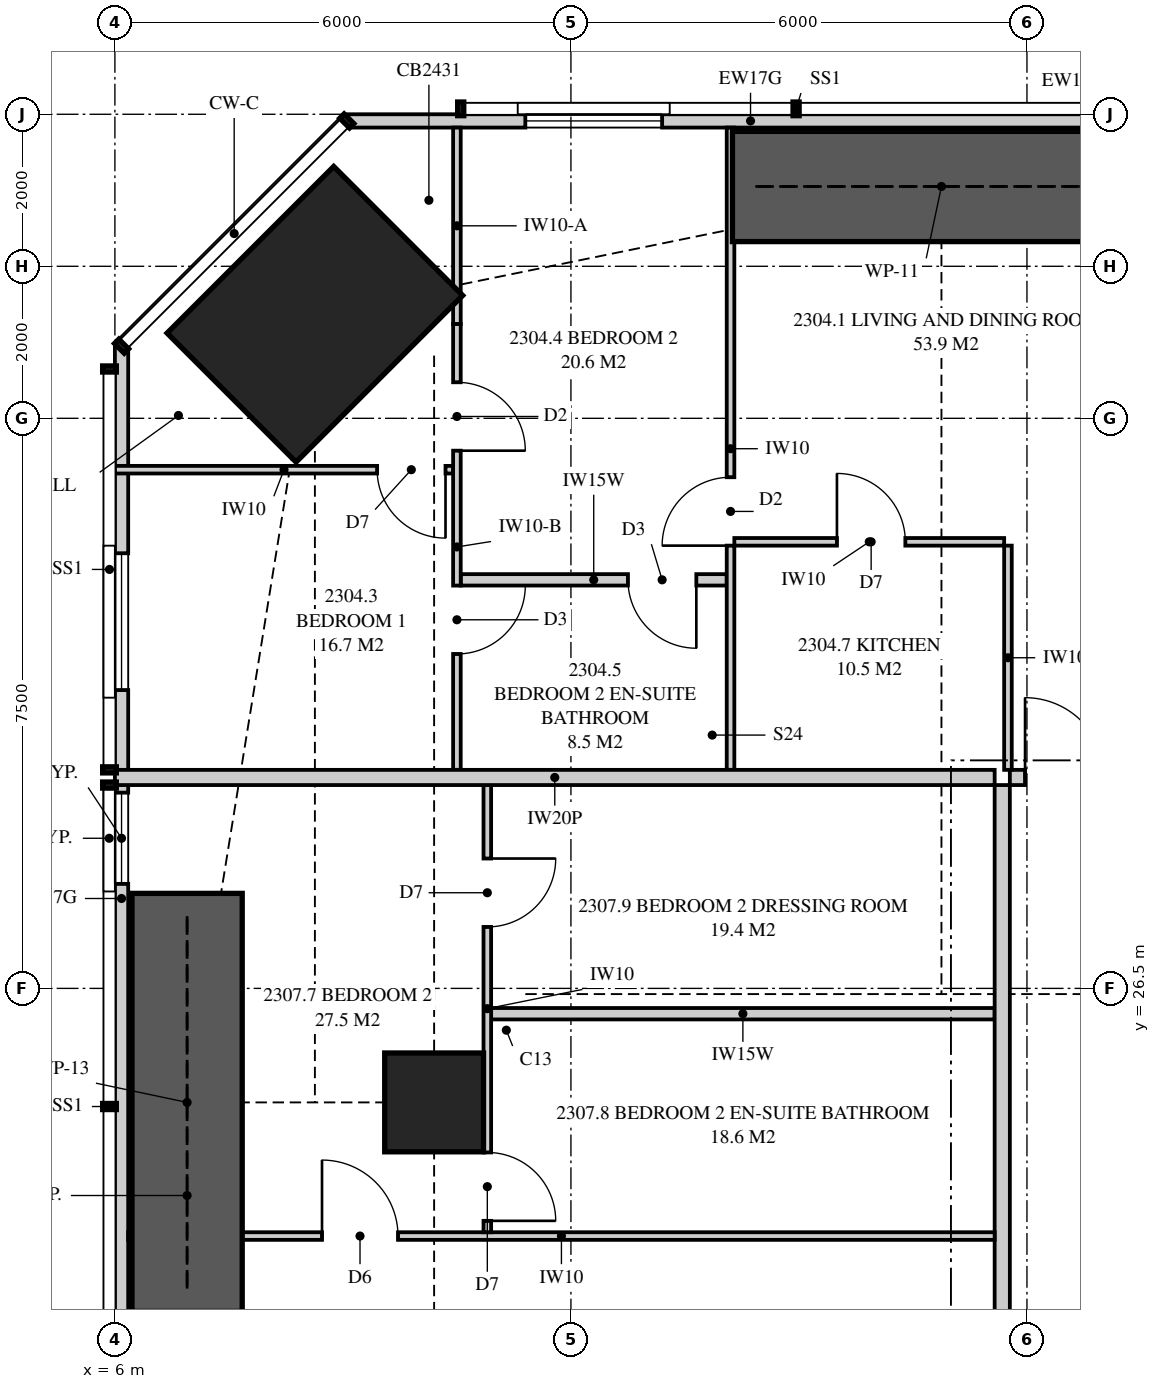
"""IFC4 building model, lengths in metres.
Left out: names, types, materials, properties, quantities, classifications, styles, units other than length and angle.
Written with IfcOpenShell. Run it as: python <this file> out.ifc"""

import sys

from ifc_helpers import new_model, si_unit, direction, frame, frame_2d, origin, origin_2d, place, context, subcontext, project, spatial, polyline, rectangle, hollow_rectangle, outline, extrude, element, fill, save


model = new_model("IFC4")
c1 = context("Model", 3, precision=1e-05, world=origin(), true_north=direction((0.0, 1.0)))
c2 = subcontext(c1, "Body", "Model", "MODEL_VIEW")
j1 = project(units=[si_unit("LENGTHUNIT", "METRE"), si_unit("PLANEANGLEUNIT", "RADIAN")], contexts=[c1])
p1 = place(None, origin())
s1 = spatial("IfcSite", under=j1, at=p1, CompositionType="ELEMENT")
p2 = place(p1, origin())
s2 = spatial("IfcBuilding", under=s1, at=p2, CompositionType="ELEMENT")
p3 = place(p2, frame((0.0, 0.0, 88.1)))
s3 = spatial("IfcBuildingStorey", under=s2, at=p3, CompositionType="ELEMENT", Elevation=88.1)
p4 = place(p3, frame((8.631, 35.369, 0.0), z_axis=(0.0, 0.0, 1.0), x_axis=(0.707106781187, -0.707106781187, 0.0)))
e1 = element("IfcColumn", 1, at=p4, inside=s3, PredefinedType="COLUMN", context=c2, shape_type="SweptSolid", body=[
    extrude(hollow_rectangle(XDim=2.4, YDim=3.1, WallThickness=0.125, at=origin_2d()), origin(), (0.0, 0.0, 1.0), 3.35),
])
p5 = place(p3, frame((10.2, 25.0, 0.0), z_axis=(0.0, 0.0, 1.0), x_axis=(1.0, 0.0, 0.0)))
e2 = element("IfcColumn", 2, at=p5, inside=s3, PredefinedType="COLUMN", context=c2, shape_type="SweptSolid", body=[
    extrude(rectangle(XDim=1.3, YDim=1.3, at=origin_2d()), origin(), (0.0, 0.0, 1.0), 3.35),
])
p6 = place(p3, frame((19.675, 37.913, 0.0), z_axis=(0.0, 0.0, 1.0), x_axis=(-1.0, 0.0, 0.0)))
e3 = element("IfcWall", 3, at=p6, inside=s3, PredefinedType="SOLIDWALL", context=c2, shape_type="SweptSolid", body=[
    extrude(outline(polyline([(0.0, 0.0), (10.624, 0.0), (10.624, 3.11), (3.003, 3.11), (3.003, 2.15), (2.958, 2.15), (2.958, 3.11), (2.8, 3.11), (2.8, 2.15), (0.0, 2.15), (0.0, 0.0)])), frame((0.0, 0.087, 0.0), z_axis=(0.0, -1.0, 0.0), x_axis=(1.0, 0.0, 0.0)), (0.0, 0.0, 1.0), 0.175),
])
p7 = place(p6, frame((6.475, 0.0, 0.4)))
e4 = element("IfcOpeningElement", 4, at=p7, cuts=e3, PredefinedType="OPENING", context=c2, shape_type="SweptSolid", body=[
    extrude(rectangle(XDim=1.8, YDim=1.7, at=frame_2d((0.9, 0.85))), frame((0.0, 0.097, 0.0), z_axis=(0.0, -1.0, 0.0), x_axis=(1.0, 0.0, 0.0)), (0.0, 0.0, 1.0), 0.195),
])
p8 = place(p3, frame((6.087, 34.949, 0.0), z_axis=(0.0, 0.0, 1.0), x_axis=(0.0, -1.0, 0.0)))
e5 = element("IfcWall", 5, at=p8, inside=s3, PredefinedType="SOLIDWALL", context=c2, shape_type="SweptSolid", body=[
    extrude(outline(polyline([(0.0, 0.0), (14.532, 0.0), (14.532, 2.15), (9.949, 2.15), (9.949, 3.11), (9.823, 3.11), (9.823, 2.15), (9.73, 2.15), (9.73, 3.11), (0.0, 3.11), (0.0, 0.0)])), frame((0.0, 0.087, 0.0), z_axis=(0.0, -1.0, 0.0), x_axis=(1.0, 0.0, 0.0)), (0.0, 0.0, 1.0), 0.175),
])
p9 = place(p8, frame((2.724, 0.0, 0.4)))
e6 = element("IfcOpeningElement", 6, at=p9, cuts=e5, PredefinedType="OPENING", context=c2, shape_type="SweptSolid", body=[
    extrude(rectangle(XDim=1.8, YDim=1.7, at=frame_2d((0.9, 0.85))), frame((0.0, 0.097, 0.0), z_axis=(0.0, -1.0, 0.0), x_axis=(1.0, 0.0, 0.0)), (0.0, 0.0, 1.0), 0.195),
])
p10 = place(p8, frame((5.874, 0.0, 0.4)))
e7 = element("IfcOpeningElement", 7, at=p10, cuts=e5, PredefinedType="OPENING", context=c2, shape_type="SweptSolid", body=[
    extrude(rectangle(XDim=1.2, YDim=1.7, at=frame_2d((0.6, 0.85))), frame((0.0, 0.097, 0.0), z_axis=(0.0, -1.0, 0.0), x_axis=(1.0, 0.0, 0.0)), (0.0, 0.0, 1.0), 0.195),
])
p11 = place(p3, frame((17.775, 29.275, 0.0), z_axis=(0.0, 0.0, 1.0), x_axis=(1.0, 0.0, 0.0)))
e8 = element("IfcWall", 8, at=p11, inside=s3, PredefinedType="PARTITIONING", context=c2, shape_type="SweptSolid", body=[
    extrude(rectangle(XDim=8.375, YDim=0.2, at=frame_2d((4.188, 0.0))), origin(), (0.0, 0.0, 1.0), 3.11),
])
p12 = place(p11, frame((0.2, 0.0, 0.0)))
e9 = element("IfcOpeningElement", 9, at=p12, cuts=e8, PredefinedType="OPENING", context=c2, shape_type="SweptSolid", body=[
    extrude(rectangle(XDim=1.05, YDim=2.2, at=frame_2d((0.525, 1.1))), frame((0.0, 0.11, 0.0), z_axis=(0.0, -1.0, 0.0), x_axis=(1.0, 0.0, 0.0)), (0.0, 0.0, 1.0), 0.22),
])
p13 = place(p3, frame((10.5, 37.825, 0.0), z_axis=(0.0, 0.0, 1.0), x_axis=(0.0, -1.0, 0.0)))
e10 = element("IfcWall", 10, at=p13, inside=s3, PredefinedType="PARTITIONING", context=c2, shape_type="SweptSolid", body=[
    extrude(outline(polyline([(0.0, 0.0), (2.585, 0.0), (2.585, 2.15), (1.198, 2.15), (1.198, 3.11), (0.0, 3.11), (0.0, 0.0)])), frame((0.0, 0.05, 0.0), z_axis=(0.0, -1.0, 0.0), x_axis=(1.0, 0.0, 0.0)), (0.0, 0.0, 1.0), 0.1),
])
p14 = place(p3, frame((10.5, 35.24, 0.0), z_axis=(0.0, 0.0, 1.0), x_axis=(0.0, -1.0, 0.0)))
e11 = element("IfcWall", 11, at=p14, inside=s3, PredefinedType="PARTITIONING", context=c2, shape_type="SweptSolid", body=[
    extrude(outline(polyline([(0.0, 0.0), (5.865, 0.0), (5.865, 2.51), (0.368, 2.51), (0.368, 2.15), (0.0, 2.15), (0.0, 0.0)])), frame((0.0, 0.05, 0.0), z_axis=(0.0, -1.0, 0.0), x_axis=(1.0, 0.0, 0.0)), (0.0, 0.0, 1.0), 0.1),
])
p15 = place(p14, frame((0.766, 0.0, 0.0)))
e12 = element("IfcOpeningElement", 12, at=p15, cuts=e11, PredefinedType="OPENING", context=c2, shape_type="SweptSolid", body=[
    extrude(rectangle(XDim=0.9, YDim=2.1, at=frame_2d((0.45, 1.05))), frame((0.0, 0.06, 0.0), z_axis=(0.0, -1.0, 0.0), x_axis=(1.0, 0.0, 0.0)), (0.0, 0.0, 1.0), 0.12),
])
p16 = place(p14, frame((3.441, 0.0, 0.0)))
e13 = element("IfcOpeningElement", 13, at=p16, cuts=e11, PredefinedType="OPENING", context=c2, shape_type="SweptSolid", body=[
    extrude(rectangle(XDim=0.9, YDim=2.1, at=frame_2d((0.45, 1.05))), frame((0.0, 0.06, 0.0), z_axis=(0.0, -1.0, 0.0), x_axis=(1.0, 0.0, 0.0)), (0.0, 0.0, 1.0), 0.12),
])
p17 = place(p3, frame((14.1, 37.825, 0.0), z_axis=(0.0, 0.0, 1.0), x_axis=(0.0, -1.0, 0.0)))
e14 = element("IfcWall", 14, at=p17, inside=s3, PredefinedType="PARTITIONING", context=c2, shape_type="SweptSolid", body=[
    extrude(outline(polyline([(0.0, 0.0), (8.45, 0.0), (8.45, 3.11), (2.219, 3.11), (2.219, 2.15), (0.463, 2.15), (0.463, 3.11), (0.0, 3.11), (0.0, 0.0)])), frame((0.0, 0.05, 0.0), z_axis=(0.0, -1.0, 0.0), x_axis=(1.0, 0.0, 0.0)), (0.0, 0.0, 1.0), 0.1),
])
p18 = place(p17, frame((4.6, 0.0, 0.0)))
e15 = element("IfcOpeningElement", 15, at=p18, cuts=e14, PredefinedType="OPENING", context=c2, shape_type="SweptSolid", body=[
    extrude(rectangle(XDim=0.9, YDim=2.1, at=frame_2d((0.45, 1.05))), frame((0.0, 0.06, 0.0), z_axis=(0.0, -1.0, 0.0), x_axis=(1.0, 0.0, 0.0)), (0.0, 0.0, 1.0), 0.12),
])
p19 = place(p3, frame((6.0, 33.324, 0.0), z_axis=(0.0, 0.0, 1.0), x_axis=(1.0, 0.0, 0.0)))
e16 = element("IfcWall", 16, at=p19, inside=s3, PredefinedType="PARTITIONING", context=c2, shape_type="SweptSolid", body=[
    extrude(outline(polyline([(0.0, 0.0), (4.45, 0.0), (4.45, 3.11), (4.45, 2.51), (3.171, 2.51), (3.171, 2.15), (1.429, 2.15), (1.429, 3.11), (0.0, 3.11), (0.0, 0.0)])), frame((0.0, 0.05, 0.0), z_axis=(0.0, -1.0, 0.0), x_axis=(1.0, 0.0, 0.0)), (0.0, 0.0, 1.0), 0.1),
])
p20 = place(p19, frame((3.45, 0.0, 0.0)))
e17 = element("IfcOpeningElement", 17, at=p20, cuts=e16, PredefinedType="OPENING", context=c2, shape_type="SweptSolid", body=[
    extrude(rectangle(XDim=0.9, YDim=2.1, at=frame_2d((0.45, 1.05))), frame((0.0, 0.06, 0.0), z_axis=(0.0, -1.0, 0.0), x_axis=(1.0, 0.0, 0.0)), (0.0, 0.0, 1.0), 0.12),
])
p21 = place(p3, frame((10.55, 31.875, 0.0), z_axis=(0.0, 0.0, 1.0), x_axis=(1.0, 0.0, 0.0)))
e18 = element("IfcWall", 18, at=p21, inside=s3, PredefinedType="PLUMBINGWALL", context=c2, shape_type="SweptSolid", body=[
    extrude(outline(polyline([(0.0, 0.0), (3.5, 0.0), (3.5, 3.11), (0.935, 3.11), (0.935, 2.51), (0.0, 2.51), (0.0, 3.11), (0.0, 0.0)])), frame((0.0, 0.075, 0.0), z_axis=(0.0, -1.0, 0.0), x_axis=(1.0, 0.0, 0.0)), (0.0, 0.0, 1.0), 0.15),
])
p22 = place(p21, frame((2.2, 0.0, 0.0)))
e19 = element("IfcOpeningElement", 19, at=p22, cuts=e18, PredefinedType="OPENING", context=c2, shape_type="SweptSolid", body=[
    extrude(rectangle(XDim=0.9, YDim=2.1, at=frame_2d((0.45, 1.05))), frame((0.0, 0.085, 0.0), z_axis=(0.0, -1.0, 0.0), x_axis=(1.0, 0.0, 0.0)), (0.0, 0.0, 1.0), 0.17),
])
p23 = place(p3, frame((14.15, 32.375, 0.0), z_axis=(0.0, 0.0, 1.0), x_axis=(1.0, 0.0, 0.0)))
e20 = element("IfcWall", 20, at=p23, inside=s3, PredefinedType="PARTITIONING", context=c2, shape_type="SweptSolid", body=[
    extrude(outline(polyline([(0.0, 0.0), (3.55, 0.0), (3.55, 3.11), (3.021, 3.11), (3.021, 2.531), (2.429, 2.531), (2.429, 3.11), (0.0, 3.11), (0.0, 0.0)])), frame((0.0, 0.05, 0.0), z_axis=(0.0, -1.0, 0.0), x_axis=(1.0, 0.0, 0.0)), (0.0, 0.0, 1.0), 0.1),
])
p24 = place(p23, frame((1.35, 0.0, 0.0)))
e21 = element("IfcOpeningElement", 21, at=p24, cuts=e20, PredefinedType="OPENING", context=c2, shape_type="SweptSolid", body=[
    extrude(rectangle(XDim=0.9, YDim=2.1, at=frame_2d((0.45, 1.05))), frame((0.0, 0.06, 0.0), z_axis=(0.0, -1.0, 0.0), x_axis=(1.0, 0.0, 0.0)), (0.0, 0.0, 1.0), 0.12),
])
p25 = place(p3, frame((17.75, 32.325, 0.0), z_axis=(0.0, 0.0, 1.0), x_axis=(0.0, -1.0, 0.0)))
e22 = element("IfcWall", 22, at=p25, inside=s3, PredefinedType="PARTITIONING", context=c2, shape_type="SweptSolid", body=[
    extrude(rectangle(XDim=2.95, YDim=0.1, at=frame_2d((1.475, 0.0))), origin(), (0.0, 0.0, 1.0), 3.11),
])
p26 = place(p3, frame((6.0, 29.275, 0.0), z_axis=(0.0, 0.0, 1.0), x_axis=(1.0, 0.0, 0.0)))
e23 = element("IfcWall", 23, at=p26, inside=s3, PredefinedType="PARTITIONING", context=c2, shape_type="SweptSolid", body=[
    extrude(outline(polyline([(0.0, 0.0), (11.575, 0.0), (11.575, 3.11), (11.221, 3.11), (11.221, 2.531), (10.529, 2.531), (10.529, 3.11), (5.51, 3.11), (5.51, 2.51), (2.978, 2.51), (2.978, 2.531), (2.565, 2.531), (2.565, 2.15), (0.721, 2.15), (0.721, 3.11), (0.0, 3.11), (0.0, 0.0)])), frame((0.0, 0.1, 0.0), z_axis=(0.0, -1.0, 0.0), x_axis=(1.0, 0.0, 0.0)), (0.0, 0.0, 1.0), 0.2),
])
p27 = place(p3, frame((6.175, 23.242, 0.0), z_axis=(0.0, 0.0, 1.0), x_axis=(1.0, 0.0, 0.0)))
e24 = element("IfcWall", 24, at=p27, inside=s3, PredefinedType="PARTITIONING", context=c2, shape_type="SweptSolid", body=[
    extrude(outline(polyline([(0.526, 2.15), (0.0, 2.15), (0.0, 0.0), (0.526, 0.0), (0.526, 0.28), (1.024, 0.28), (1.024, 0.0), (11.4, 0.0), (11.4, 3.11), (5.285, 3.11), (5.285, 2.51), (2.765, 2.51), (2.765, 3.11), (1.635, 3.11), (1.635, 2.15), (1.024, 2.15), (1.024, 1.87), (0.526, 1.87), (0.526, 2.15)])), frame((0.0, 0.05, 0.0), z_axis=(0.0, -1.0, 0.0), x_axis=(1.0, 0.0, 0.0)), (0.0, 0.0, 1.0), 0.1),
])
p28 = place(p27, frame((2.55, 0.0, 0.0)))
e25 = element("IfcOpeningElement", 25, at=p28, cuts=e24, PredefinedType="OPENING", context=c2, shape_type="SweptSolid", body=[
    extrude(rectangle(XDim=1.0, YDim=2.1, at=frame_2d((0.5, 1.05))), frame((0.0, 0.06, 0.0), z_axis=(0.0, -1.0, 0.0), x_axis=(1.0, 0.0, 0.0)), (0.0, 0.0, 1.0), 0.12),
])
p29 = place(p3, frame((17.675, 19.7, 0.0), z_axis=(0.0, 0.0, 1.0), x_axis=(0.0, 1.0, 0.0)))
e26 = element("IfcWall", 26, at=p29, inside=s3, PredefinedType="PARTITIONING", context=c2, shape_type="SweptSolid", body=[
    extrude(outline(polyline([(0.0, 0.0), (9.475, 0.0), (9.475, 3.11), (7.071, 3.11), (7.071, 2.531), (6.379, 2.531), (6.379, 3.11), (0.0, 3.11), (0.0, 0.0)])), frame((0.0, 0.1, 0.0), z_axis=(0.0, -1.0, 0.0), x_axis=(1.0, 0.0, 0.0)), (0.0, 0.0, 1.0), 0.2),
])
p30 = place(p3, frame((10.9, 23.292, 0.0), z_axis=(0.0, 0.0, 1.0), x_axis=(0.0, 1.0, 0.0)))
e27 = element("IfcWall", 27, at=p30, inside=s3, PredefinedType="PARTITIONING", context=c2, shape_type="SweptSolid", body=[
    extrude(outline(polyline([(0.0, 0.0), (5.883, 0.0), (5.883, 3.11), (5.883, 2.51), (1.768, 2.51), (0.0, 2.51), (0.0, 3.11), (0.0, 0.0)])), frame((0.0, 0.05, 0.0), z_axis=(0.0, -1.0, 0.0), x_axis=(1.0, 0.0, 0.0)), (0.0, 0.0, 1.0), 0.1),
])
p31 = place(p30, frame((0.15, 0.0, 0.0)))
e28 = element("IfcOpeningElement", 28, at=p31, cuts=e27, PredefinedType="OPENING", context=c2, shape_type="SweptSolid", body=[
    extrude(rectangle(XDim=0.9, YDim=2.1, at=frame_2d((0.45, 1.05))), frame((0.0, 0.06, 0.0), z_axis=(0.0, -1.0, 0.0), x_axis=(1.0, 0.0, 0.0)), (0.0, 0.0, 1.0), 0.12),
])
p32 = place(p30, frame((4.017, 0.0, 0.0)))
e29 = element("IfcOpeningElement", 29, at=p32, cuts=e27, PredefinedType="OPENING", context=c2, shape_type="SweptSolid", body=[
    extrude(rectangle(XDim=0.9, YDim=2.1, at=frame_2d((0.45, 1.05))), frame((0.0, 0.06, 0.0), z_axis=(0.0, -1.0, 0.0), x_axis=(1.0, 0.0, 0.0)), (0.0, 0.0, 1.0), 0.12),
])
p33 = place(p3, frame((10.95, 26.167, 0.0), z_axis=(0.0, 0.0, 1.0), x_axis=(1.0, 0.0, 0.0)))
e30 = element("IfcWall", 30, at=p33, inside=s3, PredefinedType="PLUMBINGWALL", context=c2, shape_type="SweptSolid", body=[
    extrude(outline(polyline([(0.0, 0.0), (6.625, 0.0), (6.625, 3.11), (6.625, 2.531), (0.535, 2.531), (0.535, 2.51), (0.0, 2.51), (0.0, 3.11), (0.0, 0.0)])), frame((0.0, 0.075, 0.0), z_axis=(0.0, -1.0, 0.0), x_axis=(1.0, 0.0, 0.0)), (0.0, 0.0, 1.0), 0.15),
])
for number, where, z_axis, x_axis in (
    (31, (14.125, 37.05, 0.0), (0.0, 0.0, 1.0), (1.0, 0.0, 0.0)),
    (32, (6.95, 22.25, 0.0), (0.0, 0.0, 1.0), (0.0, 1.0, 0.0)),
):
    element("IfcWall", number, at=place(p3, frame(where, z_axis=z_axis, x_axis=x_axis)), inside=s3, PredefinedType="SHEAR", context=c2, shape_type="SweptSolid", body=[
        extrude(rectangle(XDim=5.5, YDim=1.45, at=frame_2d((2.75, 0.0))), origin(), (0.0, 0.0, 1.0), 3.35),
    ])
p34 = place(p7, origin())
e33 = element("IfcWindow", 33, at=p34, inside=s3, PartitioningType="SINGLE_PANEL", PredefinedType="WINDOW", context=c2, shape_type="SweptSolid", body=[
    extrude(rectangle(XDim=1.8, YDim=1.7, at=frame_2d((0.9, 0.85))), frame((0.0, 0.03, 0.0), z_axis=(0.0, -1.0, 0.0), x_axis=(1.0, 0.0, 0.0)), (0.0, 0.0, 1.0), 0.06),
])
fill(e4, e33)
p35 = place(p9, origin())
e34 = element("IfcWindow", 34, at=p35, inside=s3, PartitioningType="SINGLE_PANEL", PredefinedType="WINDOW", context=c2, shape_type="SweptSolid", body=[
    extrude(rectangle(XDim=1.8, YDim=1.7, at=frame_2d((0.9, 0.85))), frame((0.0, 0.03, 0.0), z_axis=(0.0, -1.0, 0.0), x_axis=(1.0, 0.0, 0.0)), (0.0, 0.0, 1.0), 0.06),
])
fill(e6, e34)
p36 = place(p10, origin())
e35 = element("IfcWindow", 35, at=p36, inside=s3, PartitioningType="SINGLE_PANEL", PredefinedType="WINDOW", context=c2, shape_type="SweptSolid", body=[
    extrude(rectangle(XDim=1.2, YDim=1.7, at=frame_2d((0.6, 0.85))), frame((0.0, 0.03, 0.0), z_axis=(0.0, -1.0, 0.0), x_axis=(1.0, 0.0, 0.0)), (0.0, 0.0, 1.0), 0.06),
])
fill(e7, e35)
p37 = place(p12, origin())
e36 = element("IfcDoor", 36, at=p37, inside=s3, OperationType="SINGLE_SWING_LEFT", PredefinedType="DOOR", context=c2, shape_type="SweptSolid", body=[
    extrude(rectangle(XDim=1.05, YDim=2.2, at=frame_2d((0.525, 1.1))), frame((0.0, 0.025, 0.0), z_axis=(0.0, -1.0, 0.0), x_axis=(1.0, 0.0, 0.0)), (0.0, 0.0, 1.0), 0.05),
])
fill(e9, e36)
p38 = place(p20, frame((0.9, 0.0, 0.0), z_axis=(0.0, 0.0, 1.0), x_axis=(-1.0, 0.0, 0.0)))
e37 = element("IfcDoor", 37, at=p38, inside=s3, OperationType="SINGLE_SWING_LEFT", PredefinedType="DOOR", context=c2, shape_type="SweptSolid", body=[
    extrude(rectangle(XDim=0.9, YDim=2.1, at=frame_2d((0.45, 1.05))), frame((0.0, 0.025, 0.0), z_axis=(0.0, -1.0, 0.0), x_axis=(1.0, 0.0, 0.0)), (0.0, 0.0, 1.0), 0.05),
])
fill(e17, e37)
p39 = place(p15, origin())
e38 = element("IfcDoor", 38, at=p39, inside=s3, OperationType="SINGLE_SWING_RIGHT", PredefinedType="DOOR", context=c2, shape_type="SweptSolid", body=[
    extrude(rectangle(XDim=0.9, YDim=2.1, at=frame_2d((0.45, 1.05))), frame((0.0, 0.025, 0.0), z_axis=(0.0, -1.0, 0.0), x_axis=(1.0, 0.0, 0.0)), (0.0, 0.0, 1.0), 0.05),
])
fill(e12, e38)
p40 = place(p18, frame((0.9, 0.0, 0.0), z_axis=(0.0, 0.0, 1.0), x_axis=(-1.0, 0.0, 0.0)))
e39 = element("IfcDoor", 39, at=p40, inside=s3, OperationType="SINGLE_SWING_LEFT", PredefinedType="DOOR", context=c2, shape_type="SweptSolid", body=[
    extrude(rectangle(XDim=0.9, YDim=2.1, at=frame_2d((0.45, 1.05))), frame((0.0, 0.025, 0.0), z_axis=(0.0, -1.0, 0.0), x_axis=(1.0, 0.0, 0.0)), (0.0, 0.0, 1.0), 0.05),
])
fill(e15, e39)
p41 = place(p22, frame((0.9, 0.0, 0.0), z_axis=(0.0, 0.0, 1.0), x_axis=(-1.0, 0.0, 0.0)))
e40 = element("IfcDoor", 40, at=p41, inside=s3, OperationType="SINGLE_SWING_LEFT", PredefinedType="DOOR", context=c2, shape_type="SweptSolid", body=[
    extrude(rectangle(XDim=0.9, YDim=2.1, at=frame_2d((0.45, 1.05))), frame((0.0, 0.025, 0.0), z_axis=(0.0, -1.0, 0.0), x_axis=(1.0, 0.0, 0.0)), (0.0, 0.0, 1.0), 0.05),
])
fill(e19, e40)
p42 = place(p16, origin())
e41 = element("IfcDoor", 41, at=p42, inside=s3, OperationType="SINGLE_SWING_LEFT", PredefinedType="DOOR", context=c2, shape_type="SweptSolid", body=[
    extrude(rectangle(XDim=0.9, YDim=2.1, at=frame_2d((0.45, 1.05))), frame((0.0, 0.025, 0.0), z_axis=(0.0, -1.0, 0.0), x_axis=(1.0, 0.0, 0.0)), (0.0, 0.0, 1.0), 0.05),
])
fill(e13, e41)
p43 = place(p24, origin())
e42 = element("IfcDoor", 42, at=p43, inside=s3, OperationType="SINGLE_SWING_LEFT", PredefinedType="DOOR", context=c2, shape_type="SweptSolid", body=[
    extrude(rectangle(XDim=0.9, YDim=2.1, at=frame_2d((0.45, 1.05))), frame((0.0, 0.025, 0.0), z_axis=(0.0, -1.0, 0.0), x_axis=(1.0, 0.0, 0.0)), (0.0, 0.0, 1.0), 0.05),
])
fill(e21, e42)
p44 = place(p28, origin())
e43 = element("IfcDoor", 43, at=p44, inside=s3, OperationType="SINGLE_SWING_LEFT", PredefinedType="DOOR", context=c2, shape_type="SweptSolid", body=[
    extrude(rectangle(XDim=1.0, YDim=2.1, at=frame_2d((0.5, 1.05))), frame((0.0, 0.025, 0.0), z_axis=(0.0, -1.0, 0.0), x_axis=(1.0, 0.0, 0.0)), (0.0, 0.0, 1.0), 0.05),
])
fill(e25, e43)
p45 = place(p31, frame((0.9, 0.0, 0.0), z_axis=(0.0, 0.0, 1.0), x_axis=(-1.0, 0.0, 0.0)))
e44 = element("IfcDoor", 44, at=p45, inside=s3, OperationType="SINGLE_SWING_RIGHT", PredefinedType="DOOR", context=c2, shape_type="SweptSolid", body=[
    extrude(rectangle(XDim=0.9, YDim=2.1, at=frame_2d((0.45, 1.05))), frame((0.0, 0.025, 0.0), z_axis=(0.0, -1.0, 0.0), x_axis=(1.0, 0.0, 0.0)), (0.0, 0.0, 1.0), 0.05),
])
fill(e28, e44)
p46 = place(p32, frame((0.9, 0.0, 0.0), z_axis=(0.0, 0.0, 1.0), x_axis=(-1.0, 0.0, 0.0)))
e45 = element("IfcDoor", 45, at=p46, inside=s3, OperationType="SINGLE_SWING_LEFT", PredefinedType="DOOR", context=c2, shape_type="SweptSolid", body=[
    extrude(rectangle(XDim=0.9, YDim=2.1, at=frame_2d((0.45, 1.05))), frame((0.0, 0.025, 0.0), z_axis=(0.0, -1.0, 0.0), x_axis=(1.0, 0.0, 0.0)), (0.0, 0.0, 1.0), 0.05),
])
fill(e29, e45)
save(model, sys.argv[1])
